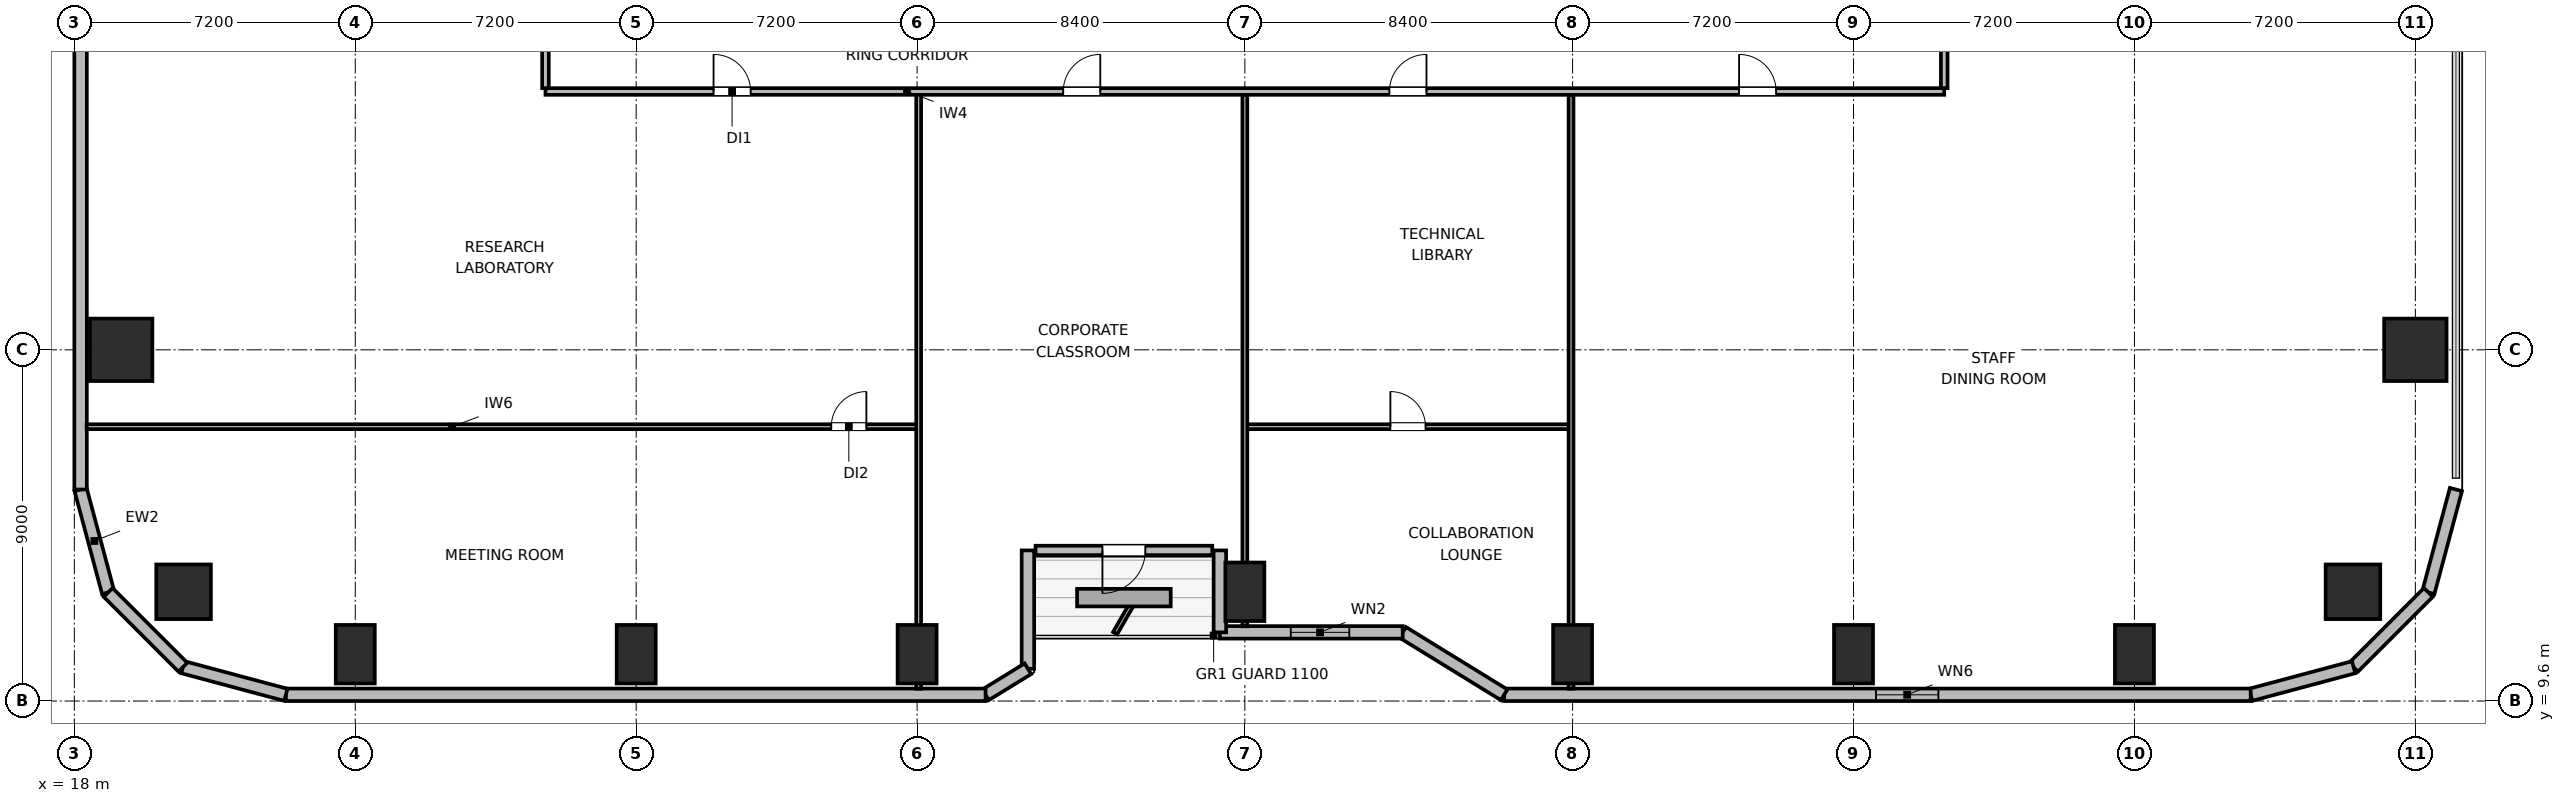
"""IFC4 building model, lengths in metres.
Left out: names, types, materials, properties, quantities, classifications, styles, units other than length and angle.
Written with IfcOpenShell. Run it as: python <this file> out.ifc"""

import sys

from ifc_helpers import new_model, si_unit, direction, frame, frame_2d, origin, origin_2d, place, context, subcontext, project, spatial, rectangle, circle, extrude, element, fill, save


model = new_model("IFC4")
c1 = context("Model", 3, precision=1e-05, world=origin(), true_north=direction((0.0, 1.0)))
c2 = subcontext(c1, "Body", "Model", "MODEL_VIEW")
j1 = project(units=[si_unit("LENGTHUNIT", "METRE"), si_unit("PLANEANGLEUNIT", "RADIAN")], contexts=[c1])
p1 = place(None, origin())
s1 = spatial("IfcSite", under=j1, at=p1, CompositionType="ELEMENT")
p2 = place(p1, origin())
s2 = spatial("IfcBuilding", under=s1, at=p2, CompositionType="ELEMENT")
p3 = place(p2, frame((0.0, 0.0, 37.2)))
s3 = spatial("IfcBuildingStorey", under=s2, at=p3, CompositionType="ELEMENT", Elevation=37.2)
for number, where, z_axis, x_axis in (
    (1, (20.8, 12.4, 0.0), (0.0, 0.0, 1.0), (1.0, 0.0, 0.0)),
    (2, (76.4, 12.4, 0.0), (0.0, 0.0, 1.0), (1.0, 0.0, 0.0)),
):
    element("IfcColumn", number, at=place(p3, frame(where, z_axis=z_axis, x_axis=x_axis)), inside=s3, PredefinedType="COLUMN", context=c2, shape_type="SweptSolid", body=[
        extrude(circle(Radius=0.7, at=origin_2d()), origin(), (0.0, 0.0, 1.0), 3.9),
    ])
for number, where, z_axis, x_axis in (
    (3, (25.2, 10.8, 0.0), (0.0, 0.0, 1.0), (1.0, 0.0, 0.0)),
    (4, (32.4, 10.8, 0.0), (0.0, 0.0, 1.0), (1.0, 0.0, 0.0)),
    (5, (39.6, 10.8, 0.0), (0.0, 0.0, 1.0), (1.0, 0.0, 0.0)),
    (6, (48.0, 12.4, 0.0), (0.0, 0.0, 1.0), (1.0, 0.0, 0.0)),
    (7, (56.4, 10.8, 0.0), (0.0, 0.0, 1.0), (1.0, 0.0, 0.0)),
    (8, (63.6, 10.8, 0.0), (0.0, 0.0, 1.0), (1.0, 0.0, 0.0)),
    (9, (70.8, 10.8, 0.0), (0.0, 0.0, 1.0), (1.0, 0.0, 0.0)),
):
    element("IfcColumn", number, at=place(p3, frame(where, z_axis=z_axis, x_axis=x_axis)), inside=s3, PredefinedType="COLUMN", context=c2, shape_type="SweptSolid", body=[
        extrude(rectangle(XDim=1.0, YDim=1.5, at=origin_2d()), origin(), (0.0, 0.0, 1.0), 3.9),
    ])
for number, where, z_axis, x_axis in (
    (10, (19.2, 18.6, 0.0), (0.0, 0.0, 1.0), (1.0, 0.0, 0.0)),
    (11, (78.0, 18.6, 0.0), (0.0, 0.0, 1.0), (1.0, 0.0, 0.0)),
):
    element("IfcColumn", number, at=place(p3, frame(where, z_axis=z_axis, x_axis=x_axis)), inside=s3, PredefinedType="COLUMN", context=c2, shape_type="SweptSolid", body=[
        extrude(rectangle(XDim=1.6, YDim=1.6, at=origin_2d()), origin(), (0.0, 0.0, 1.0), 3.9),
    ])
p4 = place(p3, frame((18.866, 12.383, 0.0), z_axis=(0.0, 0.0, 1.0), x_axis=(-0.25869736047, 0.965958423373, 0.0)))
e12 = element("IfcWall", 12, at=p4, inside=s3, PredefinedType="SOLIDWALL", context=c2, shape_type="SweptSolid", body=[
    extrude(rectangle(XDim=2.731, YDim=0.32, at=frame_2d((1.366, 0.0))), origin(), (0.0, 0.0, 1.0), 3.64),
])
p5 = place(p3, frame((18.16, 15.021, 0.0), z_axis=(0.0, 0.0, 1.0), x_axis=(0.0, 1.0, 0.0)))
e13 = element("IfcWall", 13, at=p5, inside=s3, PredefinedType="SOLIDWALL", context=c2, shape_type="SweptSolid", body=[
    extrude(rectangle(XDim=14.219, YDim=0.32, at=frame_2d((7.109, 0.0))), origin(), (0.0, 0.0, 1.0), 3.64),
])
p6 = place(p3, frame((79.04, 15.021, 0.0), z_axis=(0.0, 0.0, 1.0), x_axis=(-0.25869736047, -0.965958423373, 0.0)))
e14 = element("IfcWall", 14, at=p6, inside=s3, PredefinedType="SOLIDWALL", context=c2, shape_type="SweptSolid", body=[
    extrude(rectangle(XDim=2.731, YDim=0.32, at=frame_2d((1.366, 0.0))), origin(), (0.0, 0.0, 1.0), 3.64),
])
p7 = place(p3, frame((78.333, 12.383, 0.0), z_axis=(0.0, 0.0, 1.0), x_axis=(-0.707106781187, -0.707106781187, 0.0)))
e15 = element("IfcWall", 15, at=p7, inside=s3, PredefinedType="SOLIDWALL", context=c2, shape_type="SweptSolid", body=[
    extrude(rectangle(XDim=2.71, YDim=0.32, at=frame_2d((1.355, 0.0))), origin(), (0.0, 0.0, 1.0), 3.64),
])
p8 = place(p3, frame((76.417, 10.467, 0.0), z_axis=(0.0, 0.0, 1.0), x_axis=(-0.965964405026, -0.25867502435, 0.0)))
e16 = element("IfcWall", 16, at=p8, inside=s3, PredefinedType="SOLIDWALL", context=c2, shape_type="SweptSolid", body=[
    extrude(rectangle(XDim=2.731, YDim=0.32, at=frame_2d((1.366, 0.0))), origin(), (0.0, 0.0, 1.0), 3.64),
])
p9 = place(p3, frame((73.779, 9.76, 0.0), z_axis=(0.0, 0.0, 1.0), x_axis=(-1.0, 0.0, 0.0)))
e17 = element("IfcWall", 17, at=p9, inside=s3, PredefinedType="SOLIDWALL", context=c2, shape_type="SweptSolid", body=[
    extrude(rectangle(XDim=19.134, YDim=0.32, at=frame_2d((9.567, 0.0))), origin(), (0.0, 0.0, 1.0), 3.64),
])
p10 = place(p9, frame((8.004, 0.0, 0.85)))
e18 = element("IfcOpeningElement", 18, at=p10, cuts=e17, PredefinedType="OPENING", context=c2, shape_type="SweptSolid", body=[
    extrude(rectangle(XDim=1.6, YDim=1.0, at=frame_2d((0.8, 0.5))), frame((0.0, 0.17, 0.0), z_axis=(0.0, -1.0, 0.0), x_axis=(1.0, 0.0, 0.0)), (0.0, 0.0, 1.0), 0.34),
])
p11 = place(p3, frame((54.645, 9.76, 0.0), z_axis=(0.0, 0.0, 1.0), x_axis=(-0.851630857047, 0.524142044989, 0.0)))
e19 = element("IfcWall", 19, at=p11, inside=s3, PredefinedType="SOLIDWALL", context=c2, shape_type="SweptSolid", body=[
    extrude(rectangle(XDim=3.053, YDim=0.32, at=frame_2d((1.526, 0.0))), origin(), (0.0, 0.0, 1.0), 2.875),
])
p12 = place(p3, frame((52.045, 11.36, 0.0), z_axis=(0.0, 0.0, 1.0), x_axis=(-1.0, 0.0, 0.0)))
e20 = element("IfcWall", 20, at=p12, inside=s3, PredefinedType="SOLIDWALL", context=c2, shape_type="SweptSolid", body=[
    extrude(rectangle(XDim=4.685, YDim=0.32, at=frame_2d((2.343, 0.0))), origin(), (0.0, 0.0, 1.0), 2.875),
])
p13 = place(p12, frame((1.368, 0.0, 0.85)))
e21 = element("IfcOpeningElement", 21, at=p13, cuts=e20, PredefinedType="OPENING", context=c2, shape_type="SweptSolid", body=[
    extrude(rectangle(XDim=1.5, YDim=1.1, at=frame_2d((0.75, 0.55))), frame((0.0, 0.17, 0.0), z_axis=(0.0, -1.0, 0.0), x_axis=(1.0, 0.0, 0.0)), (0.0, 0.0, 1.0), 0.34),
])
p14 = place(p3, frame((47.36, 11.36, 0.0), z_axis=(0.0, 0.0, 1.0), x_axis=(0.0, 1.0, 0.0)))
e22 = element("IfcWall", 22, at=p14, inside=s3, PredefinedType="SOLIDWALL", context=c2, shape_type="SweptSolid", body=[
    extrude(rectangle(XDim=2.1, YDim=0.32, at=frame_2d((1.05, 0.0))), origin(), (0.0, 0.0, 1.0), 2.875),
])
p15 = place(p3, frame((47.165, 13.46, 0.0), z_axis=(0.0, 0.0, 1.0), x_axis=(-1.0, 0.0, 0.0)))
e23 = element("IfcWall", 23, at=p15, inside=s3, PredefinedType="SOLIDWALL", context=c2, shape_type="SweptSolid", body=[
    extrude(rectangle(XDim=4.53, YDim=0.24, at=frame_2d((2.265, 0.0))), origin(), (0.0, 0.0, 1.0), 3.64),
])
p16 = place(p15, frame((1.715, 0.0, 0.0)))
e24 = element("IfcOpeningElement", 24, at=p16, cuts=e23, PredefinedType="OPENING", context=c2, shape_type="SweptSolid", body=[
    extrude(rectangle(XDim=1.1, YDim=2.04, at=frame_2d((0.55, 1.02))), frame((0.0, 0.13, 0.0), z_axis=(0.0, -1.0, 0.0), x_axis=(1.0, 0.0, 0.0)), (0.0, 0.0, 1.0), 0.26),
])
p17 = place(p3, frame((42.44, 13.46, 0.0), z_axis=(0.0, 0.0, 1.0), x_axis=(0.0, -1.0, 0.0)))
e25 = element("IfcWall", 25, at=p17, inside=s3, PredefinedType="SOLIDWALL", context=c2, shape_type="SweptSolid", body=[
    extrude(rectangle(XDim=3.032, YDim=0.32, at=frame_2d((1.516, 0.0))), origin(), (0.0, 0.0, 1.0), 2.875),
])
p18 = place(p3, frame((42.44, 10.427, 0.0), z_axis=(0.0, 0.0, 1.0), x_axis=(-0.851776724646, -0.523904964045, 0.0)))
e26 = element("IfcWall", 26, at=p18, inside=s3, PredefinedType="SOLIDWALL", context=c2, shape_type="SweptSolid", body=[
    extrude(rectangle(XDim=1.274, YDim=0.32, at=frame_2d((0.637, 0.0))), origin(), (0.0, 0.0, 1.0), 3.64),
])
p19 = place(p3, frame((41.355, 9.76, 0.0), z_axis=(0.0, 0.0, 1.0), x_axis=(-1.0, 0.0, 0.0)))
e27 = element("IfcWall", 27, at=p19, inside=s3, PredefinedType="SOLIDWALL", context=c2, shape_type="SweptSolid", body=[
    extrude(rectangle(XDim=17.934, YDim=0.32, at=frame_2d((8.967, 0.0))), origin(), (0.0, 0.0, 1.0), 3.64),
])
p20 = place(p3, frame((23.421, 9.76, 0.0), z_axis=(0.0, 0.0, 1.0), x_axis=(-0.965964405026, 0.25867502435, 0.0)))
e28 = element("IfcWall", 28, at=p20, inside=s3, PredefinedType="SOLIDWALL", context=c2, shape_type="SweptSolid", body=[
    extrude(rectangle(XDim=2.731, YDim=0.32, at=frame_2d((1.366, 0.0))), origin(), (0.0, 0.0, 1.0), 3.64),
])
p21 = place(p3, frame((20.783, 10.467, 0.0), z_axis=(0.0, 0.0, 1.0), x_axis=(-0.707106781187, 0.707106781187, 0.0)))
e29 = element("IfcWall", 29, at=p21, inside=s3, PredefinedType="SOLIDWALL", context=c2, shape_type="SweptSolid", body=[
    extrude(rectangle(XDim=2.71, YDim=0.32, at=frame_2d((1.355, 0.0))), origin(), (0.0, 0.0, 1.0), 3.64),
])
p22 = place(p3, frame((30.075, 25.22, 0.0), z_axis=(0.0, 0.0, 1.0), x_axis=(1.0, 0.0, 0.0)))
e30 = element("IfcWall", 30, at=p22, inside=s3, PredefinedType="PARTITIONING", context=c2, shape_type="SweptSolid", body=[
    extrude(rectangle(XDim=35.85, YDim=0.17, at=frame_2d((17.925, 0.0))), origin(), (0.0, 0.0, 1.0), 3.64),
])
p23 = place(p22, frame((4.308, 0.0, 0.0)))
e31 = element("IfcOpeningElement", 31, at=p23, cuts=e30, PredefinedType="OPENING", context=c2, shape_type="SweptSolid", body=[
    extrude(rectangle(XDim=0.95, YDim=2.04, at=frame_2d((0.475, 1.02))), frame((0.0, 0.095, 0.0), z_axis=(0.0, -1.0, 0.0), x_axis=(1.0, 0.0, 0.0)), (0.0, 0.0, 1.0), 0.19),
])
p24 = place(p22, frame((13.27, 0.0, 0.0)))
e32 = element("IfcOpeningElement", 32, at=p24, cuts=e30, PredefinedType="OPENING", context=c2, shape_type="SweptSolid", body=[
    extrude(rectangle(XDim=0.95, YDim=2.04, at=frame_2d((0.475, 1.02))), frame((0.0, 0.095, 0.0), z_axis=(0.0, -1.0, 0.0), x_axis=(1.0, 0.0, 0.0)), (0.0, 0.0, 1.0), 0.19),
])
p25 = place(p22, frame((21.63, 0.0, 0.0)))
e33 = element("IfcOpeningElement", 33, at=p25, cuts=e30, PredefinedType="OPENING", context=c2, shape_type="SweptSolid", body=[
    extrude(rectangle(XDim=0.95, YDim=2.04, at=frame_2d((0.475, 1.02))), frame((0.0, 0.095, 0.0), z_axis=(0.0, -1.0, 0.0), x_axis=(1.0, 0.0, 0.0)), (0.0, 0.0, 1.0), 0.19),
])
p26 = place(p22, frame((30.592, 0.0, 0.0)))
e34 = element("IfcOpeningElement", 34, at=p26, cuts=e30, PredefinedType="OPENING", context=c2, shape_type="SweptSolid", body=[
    extrude(rectangle(XDim=0.95, YDim=2.04, at=frame_2d((0.475, 1.02))), frame((0.0, 0.095, 0.0), z_axis=(0.0, -1.0, 0.0), x_axis=(1.0, 0.0, 0.0)), (0.0, 0.0, 1.0), 0.19),
])
p27 = place(p3, frame((30.075, 25.307, 0.0), z_axis=(0.0, 0.0, 1.0), x_axis=(0.0, 1.0, 0.0)))
e35 = element("IfcWall", 35, at=p27, inside=s3, PredefinedType="PARTITIONING", context=c2, shape_type="SweptSolid", body=[
    extrude(rectangle(XDim=21.386, YDim=0.17, at=frame_2d((10.693, 0.0))), origin(), (0.0, 0.0, 1.0), 3.64),
])
p28 = place(p27, frame((3.528, 0.0, 0.0)))
e36 = element("IfcOpeningElement", 36, at=p28, cuts=e35, PredefinedType="OPENING", context=c2, shape_type="SweptSolid", body=[
    extrude(rectangle(XDim=0.95, YDim=2.04, at=frame_2d((0.475, 1.02))), frame((0.0, 0.095, 0.0), z_axis=(0.0, -1.0, 0.0), x_axis=(1.0, 0.0, 0.0)), (0.0, 0.0, 1.0), 0.19),
])
p29 = place(p27, frame((10.818, 0.0, 0.0)))
e37 = element("IfcOpeningElement", 37, at=p29, cuts=e35, PredefinedType="OPENING", context=c2, shape_type="SweptSolid", body=[
    extrude(rectangle(XDim=0.95, YDim=2.04, at=frame_2d((0.475, 1.02))), frame((0.0, 0.095, 0.0), z_axis=(0.0, -1.0, 0.0), x_axis=(1.0, 0.0, 0.0)), (0.0, 0.0, 1.0), 0.19),
])
p30 = place(p27, frame((17.508, 0.0, 0.0)))
e38 = element("IfcOpeningElement", 38, at=p30, cuts=e35, PredefinedType="OPENING", context=c2, shape_type="SweptSolid", body=[
    extrude(rectangle(XDim=0.95, YDim=2.04, at=frame_2d((0.475, 1.02))), frame((0.0, 0.095, 0.0), z_axis=(0.0, -1.0, 0.0), x_axis=(1.0, 0.0, 0.0)), (0.0, 0.0, 1.0), 0.19),
])
p31 = place(p3, frame((65.925, 25.307, 0.0), z_axis=(0.0, 0.0, 1.0), x_axis=(0.0, 1.0, 0.0)))
e39 = element("IfcWall", 39, at=p31, inside=s3, PredefinedType="PARTITIONING", context=c2, shape_type="SweptSolid", body=[
    extrude(rectangle(XDim=21.386, YDim=0.17, at=frame_2d((10.693, 0.0))), origin(), (0.0, 0.0, 1.0), 3.64),
])
p32 = place(p31, frame((5.428, 0.0, 0.0)))
e40 = element("IfcOpeningElement", 40, at=p32, cuts=e39, PredefinedType="OPENING", context=c2, shape_type="SweptSolid", body=[
    extrude(rectangle(XDim=0.95, YDim=2.04, at=frame_2d((0.475, 1.02))), frame((0.0, 0.095, 0.0), z_axis=(0.0, -1.0, 0.0), x_axis=(1.0, 0.0, 0.0)), (0.0, 0.0, 1.0), 0.19),
])
p33 = place(p31, frame((16.208, 0.0, 0.0)))
e41 = element("IfcOpeningElement", 41, at=p33, cuts=e39, PredefinedType="OPENING", context=c2, shape_type="SweptSolid", body=[
    extrude(rectangle(XDim=0.95, YDim=2.04, at=frame_2d((0.475, 1.02))), frame((0.0, 0.095, 0.0), z_axis=(0.0, -1.0, 0.0), x_axis=(1.0, 0.0, 0.0)), (0.0, 0.0, 1.0), 0.19),
])
p34 = place(p3, frame((18.315, 16.63, 0.0), z_axis=(0.0, 0.0, 1.0), x_axis=(1.0, 0.0, 0.0)))
e42 = element("IfcWall", 42, at=p34, inside=s3, PredefinedType="PARTITIONING", context=c2, shape_type="SweptSolid", body=[
    extrude(rectangle(XDim=21.325, YDim=0.125, at=frame_2d((10.663, 0.0))), origin(), (0.0, 0.0, 1.0), 3.64),
])
p35 = place(p34, frame((19.085, 0.0, 0.0)))
e43 = element("IfcOpeningElement", 43, at=p35, cuts=e42, PredefinedType="OPENING", context=c2, shape_type="SweptSolid", body=[
    extrude(rectangle(XDim=0.9, YDim=2.02, at=frame_2d((0.45, 1.01))), frame((0.0, 0.073, 0.0), z_axis=(0.0, -1.0, 0.0), x_axis=(1.0, 0.0, 0.0)), (0.0, 0.0, 1.0), 0.145),
])
p36 = place(p3, frame((39.64, 9.915, 0.0), z_axis=(0.0, 0.0, 1.0), x_axis=(0.0, 1.0, 0.0)))
e44 = element("IfcWall", 44, at=p36, inside=s3, PredefinedType="PARTITIONING", context=c2, shape_type="SweptSolid", body=[
    extrude(rectangle(XDim=15.218, YDim=0.125, at=frame_2d((7.609, 0.0))), origin(), (0.0, 0.0, 1.0), 2.93),
])
p37 = place(p3, frame((48.0, 16.63, 0.0), z_axis=(0.0, 0.0, 1.0), x_axis=(1.0, 0.0, 0.0)))
e45 = element("IfcWall", 45, at=p37, inside=s3, PredefinedType="PARTITIONING", context=c2, shape_type="SweptSolid", body=[
    extrude(rectangle(XDim=8.36, YDim=0.125, at=frame_2d((4.18, 0.0))), origin(), (0.0, 0.0, 1.0), 3.64),
])
p38 = place(p37, frame((3.73, 0.0, 0.0)))
e46 = element("IfcOpeningElement", 46, at=p38, cuts=e45, PredefinedType="OPENING", context=c2, shape_type="SweptSolid", body=[
    extrude(rectangle(XDim=0.9, YDim=2.02, at=frame_2d((0.45, 1.01))), frame((0.0, 0.073, 0.0), z_axis=(0.0, -1.0, 0.0), x_axis=(1.0, 0.0, 0.0)), (0.0, 0.0, 1.0), 0.145),
])
p39 = place(p3, frame((48.0, 11.515, 0.0), z_axis=(0.0, 0.0, 1.0), x_axis=(0.0, 1.0, 0.0)))
e47 = element("IfcWall", 47, at=p39, inside=s3, PredefinedType="PARTITIONING", context=c2, shape_type="SweptSolid", body=[
    extrude(rectangle(XDim=13.618, YDim=0.125, at=frame_2d((6.809, 0.0))), origin(), (0.0, 0.0, 1.0), 2.93),
])
p40 = place(p3, frame((56.36, 9.915, 0.0), z_axis=(0.0, 0.0, 1.0), x_axis=(0.0, 1.0, 0.0)))
e48 = element("IfcWall", 48, at=p40, inside=s3, PredefinedType="PARTITIONING", context=c2, shape_type="SweptSolid", body=[
    extrude(rectangle(XDim=15.218, YDim=0.125, at=frame_2d((7.609, 0.0))), origin(), (0.0, 0.0, 1.0), 2.93),
])
p41 = place(p10, origin())
e49 = element("IfcWindow", 49, at=p41, inside=s3, PartitioningType="SINGLE_PANEL", PredefinedType="WINDOW", context=c2, shape_type="SweptSolid", body=[
    extrude(rectangle(XDim=1.6, YDim=1.0, at=frame_2d((0.8, 0.5))), frame((0.0, 0.03, 0.0), z_axis=(0.0, -1.0, 0.0), x_axis=(1.0, 0.0, 0.0)), (0.0, 0.0, 1.0), 0.06),
])
fill(e18, e49)
p42 = place(p13, origin())
e50 = element("IfcWindow", 50, at=p42, inside=s3, PartitioningType="SINGLE_PANEL", PredefinedType="WINDOW", context=c2, shape_type="SweptSolid", body=[
    extrude(rectangle(XDim=1.5, YDim=1.1, at=frame_2d((0.75, 0.55))), frame((0.0, 0.03, 0.0), z_axis=(0.0, -1.0, 0.0), x_axis=(1.0, 0.0, 0.0)), (0.0, 0.0, 1.0), 0.06),
])
fill(e21, e50)
p43 = place(p16, origin())
e51 = element("IfcDoor", 51, at=p43, inside=s3, OperationType="SINGLE_SWING_RIGHT", PredefinedType="DOOR", context=c2, shape_type="SweptSolid", body=[
    extrude(rectangle(XDim=1.1, YDim=2.04, at=frame_2d((0.55, 1.02))), frame((0.0, 0.025, 0.0), z_axis=(0.0, -1.0, 0.0), x_axis=(1.0, 0.0, 0.0)), (0.0, 0.0, 1.0), 0.05),
])
fill(e24, e51)
p44 = place(p35, origin())
e52 = element("IfcDoor", 52, at=p44, inside=s3, OperationType="SINGLE_SWING_RIGHT", PredefinedType="DOOR", context=c2, shape_type="SweptSolid", body=[
    extrude(rectangle(XDim=0.9, YDim=2.02, at=frame_2d((0.45, 1.01))), frame((0.0, 0.025, 0.0), z_axis=(0.0, -1.0, 0.0), x_axis=(1.0, 0.0, 0.0)), (0.0, 0.0, 1.0), 0.05),
])
fill(e43, e52)
p45 = place(p23, origin())
e53 = element("IfcDoor", 53, at=p45, inside=s3, OperationType="SINGLE_SWING_LEFT", PredefinedType="DOOR", context=c2, shape_type="SweptSolid", body=[
    extrude(rectangle(XDim=0.95, YDim=2.04, at=frame_2d((0.475, 1.02))), frame((0.0, 0.025, 0.0), z_axis=(0.0, -1.0, 0.0), x_axis=(1.0, 0.0, 0.0)), (0.0, 0.0, 1.0), 0.05),
])
fill(e31, e53)
p46 = place(p24, origin())
e54 = element("IfcDoor", 54, at=p46, inside=s3, OperationType="SINGLE_SWING_RIGHT", PredefinedType="DOOR", context=c2, shape_type="SweptSolid", body=[
    extrude(rectangle(XDim=0.95, YDim=2.04, at=frame_2d((0.475, 1.02))), frame((0.0, 0.025, 0.0), z_axis=(0.0, -1.0, 0.0), x_axis=(1.0, 0.0, 0.0)), (0.0, 0.0, 1.0), 0.05),
])
fill(e32, e54)
p47 = place(p38, origin())
e55 = element("IfcDoor", 55, at=p47, inside=s3, OperationType="SINGLE_SWING_LEFT", PredefinedType="DOOR", context=c2, shape_type="SweptSolid", body=[
    extrude(rectangle(XDim=0.9, YDim=2.02, at=frame_2d((0.45, 1.01))), frame((0.0, 0.025, 0.0), z_axis=(0.0, -1.0, 0.0), x_axis=(1.0, 0.0, 0.0)), (0.0, 0.0, 1.0), 0.05),
])
fill(e46, e55)
p48 = place(p25, origin())
e56 = element("IfcDoor", 56, at=p48, inside=s3, OperationType="SINGLE_SWING_RIGHT", PredefinedType="DOOR", context=c2, shape_type="SweptSolid", body=[
    extrude(rectangle(XDim=0.95, YDim=2.04, at=frame_2d((0.475, 1.02))), frame((0.0, 0.025, 0.0), z_axis=(0.0, -1.0, 0.0), x_axis=(1.0, 0.0, 0.0)), (0.0, 0.0, 1.0), 0.05),
])
fill(e33, e56)
p49 = place(p26, origin())
e57 = element("IfcDoor", 57, at=p49, inside=s3, OperationType="SINGLE_SWING_LEFT", PredefinedType="DOOR", context=c2, shape_type="SweptSolid", body=[
    extrude(rectangle(XDim=0.95, YDim=2.04, at=frame_2d((0.475, 1.02))), frame((0.0, 0.025, 0.0), z_axis=(0.0, -1.0, 0.0), x_axis=(1.0, 0.0, 0.0)), (0.0, 0.0, 1.0), 0.05),
])
fill(e34, e57)
save(model, sys.argv[1])
